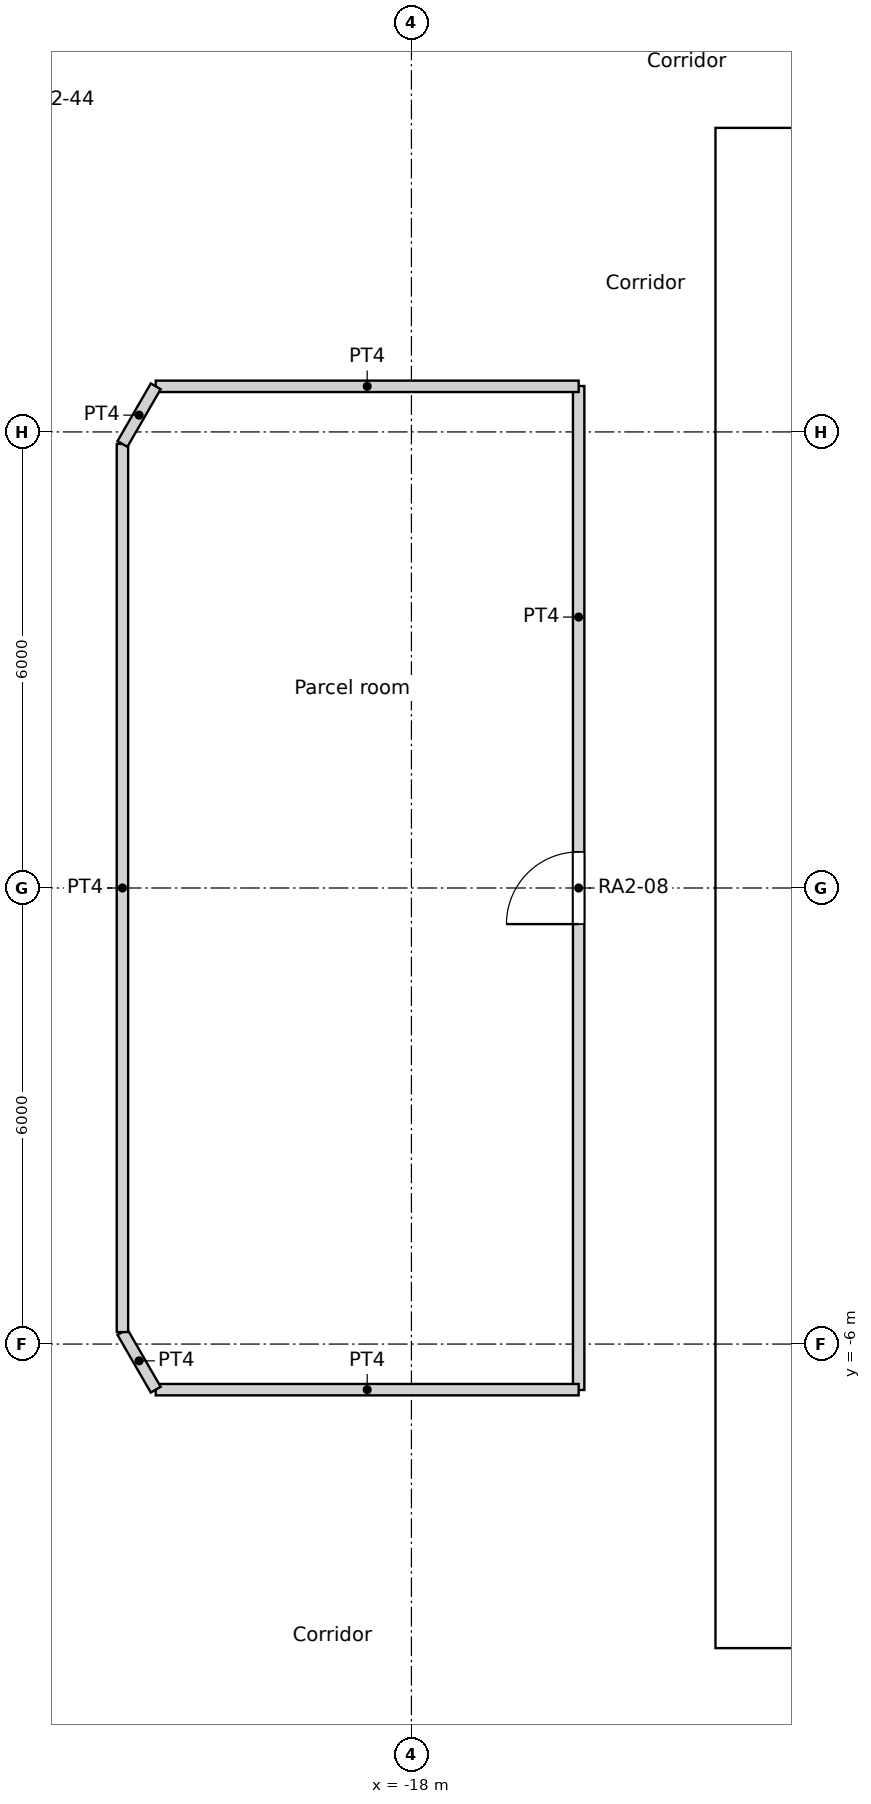
"""IFC4 building model, lengths in metres.
Left out: names, types, materials, properties, quantities, classifications, styles, units other than length and angle.
Written with IfcOpenShell. Run it as: python <this file> out.ifc"""

import sys

from ifc_helpers import new_model, si_unit, direction, frame, frame_2d, origin, origin_2d, place, context, subcontext, project, spatial, rectangle, circle, extrude, element, fill, save


model = new_model("IFC4")
c1 = context("Model", 3, precision=1e-05, world=origin(), true_north=direction((0.0, 1.0)))
c2 = subcontext(c1, "Body", "Model", "MODEL_VIEW")
j1 = project(units=[si_unit("LENGTHUNIT", "METRE"), si_unit("PLANEANGLEUNIT", "RADIAN")], contexts=[c1])
p1 = place(None, origin())
s1 = spatial("IfcSite", under=j1, at=p1, CompositionType="ELEMENT")
p2 = place(p1, origin())
s2 = spatial("IfcBuilding", under=s1, at=p2, CompositionType="ELEMENT")
p3 = place(p2, frame((0.0, 0.0, 39.0)))
s3 = spatial("IfcBuildingStorey", under=s2, at=p3, CompositionType="ELEMENT", Elevation=39.0)
for number, where, z_axis, x_axis in (
    (1, (-23.067, 8.396, 0.0), (0.0, 0.0, 1.0), (1.0, 0.0, 0.0)),
    (2, (-23.067, -8.396, 0.0), (0.0, 0.0, 1.0), (1.0, 0.0, 0.0)),
):
    element("IfcColumn", number, at=place(p3, frame(where, z_axis=z_axis, x_axis=x_axis)), inside=s3, PredefinedType="COLUMN", context=c2, shape_type="SweptSolid", body=[
        extrude(circle(Radius=0.75, at=origin_2d()), origin(), (0.0, 0.0, 1.0), 3.6),
    ])
for number, where, z_axis, x_axis in (
    (3, (-16.958, 8.167, 0.0), (0.0, 0.0, 1.0), (1.0, 0.0, 0.0)),
    (4, (-18.612, 2.805, 0.0), (0.0, 0.0, 1.0), (1.0, 0.0, 0.0)),
    (5, (-18.612, -2.805, 0.0), (0.0, 0.0, 1.0), (1.0, 0.0, 0.0)),
    (6, (-16.958, -8.167, 0.0), (0.0, 0.0, 1.0), (1.0, 0.0, 0.0)),
):
    element("IfcColumn", number, at=place(p3, frame(where, z_axis=z_axis, x_axis=x_axis)), inside=s3, PredefinedType="COLUMN", context=c2, shape_type="SweptSolid", body=[
        extrude(circle(Radius=0.8, at=origin_2d()), origin(), (0.0, 0.0, 1.0), 3.6),
    ])
p4 = place(p3, frame((-14.0, -9.4, 0.0), z_axis=(0.0, 0.0, 1.0), x_axis=(1.0, 0.0, 0.0)))
e7 = element("IfcWall", 7, at=p4, inside=s3, PredefinedType="SOLIDWALL", context=c2, shape_type="SweptSolid", body=[
    extrude(rectangle(XDim=28.0, YDim=1.2, at=frame_2d((14.0, 0.0))), origin(), (0.0, 0.0, 1.0), 3.6),
])
p5 = place(p4, frame((14.9, 0.0, 0.0)))
e8 = element("IfcOpeningElement", 8, at=p5, cuts=e7, PredefinedType="OPENING", context=c2, shape_type="SweptSolid", body=[
    extrude(rectangle(XDim=1.0, YDim=2.1, at=frame_2d((0.5, 1.05))), frame((0.0, 0.6, 0.0), z_axis=(0.0, -1.0, 0.0), x_axis=(1.0, 0.0, 0.0)), (0.0, 0.0, 1.0), 1.2),
])
p6 = place(p4, frame((9.8, 0.0, 0.0)))
e9 = element("IfcOpeningElement", 9, at=p6, cuts=e7, PredefinedType="OPENING", context=c2, shape_type="SweptSolid", body=[
    extrude(rectangle(XDim=1.8, YDim=2.1, at=frame_2d((0.9, 1.05))), frame((0.0, 0.6, 0.0), z_axis=(0.0, -1.0, 0.0), x_axis=(1.0, 0.0, 0.0)), (0.0, 0.0, 1.0), 1.2),
])
p7 = place(p4, frame((16.4, 0.0, 0.0)))
e10 = element("IfcOpeningElement", 10, at=p7, cuts=e7, PredefinedType="OPENING", context=c2, shape_type="SweptSolid", body=[
    extrude(rectangle(XDim=1.8, YDim=2.1, at=frame_2d((0.9, 1.05))), frame((0.0, 0.6, 0.0), z_axis=(0.0, -1.0, 0.0), x_axis=(1.0, 0.0, 0.0)), (0.0, 0.0, 1.0), 1.2),
])
p8 = place(p3, frame((-14.0, 9.4, 0.0), z_axis=(0.0, 0.0, 1.0), x_axis=(1.0, 0.0, 0.0)))
e11 = element("IfcWall", 11, at=p8, inside=s3, PredefinedType="SOLIDWALL", context=c2, shape_type="SweptSolid", body=[
    extrude(rectangle(XDim=28.0, YDim=1.2, at=frame_2d((14.0, 0.0))), origin(), (0.0, 0.0, 1.0), 3.6),
])
p9 = place(p8, frame((9.8, 0.0, 0.0)))
e12 = element("IfcOpeningElement", 12, at=p9, cuts=e11, PredefinedType="OPENING", context=c2, shape_type="SweptSolid", body=[
    extrude(rectangle(XDim=1.8, YDim=2.1, at=frame_2d((0.9, 1.05))), frame((0.0, 0.6, 0.0), z_axis=(0.0, -1.0, 0.0), x_axis=(1.0, 0.0, 0.0)), (0.0, 0.0, 1.0), 1.2),
])
p10 = place(p3, frame((-13.4, -8.8, 0.0), z_axis=(0.0, 0.0, 1.0), x_axis=(0.0, 1.0, 0.0)))
e13 = element("IfcWall", 13, at=p10, inside=s3, PredefinedType="SOLIDWALL", context=c2, shape_type="SweptSolid", body=[
    extrude(rectangle(XDim=17.6, YDim=1.2, at=frame_2d((8.8, 0.0))), origin(), (0.0, 0.0, 1.0), 3.6),
])
p11 = place(p10, frame((5.2, 0.0, 0.0)))
e14 = element("IfcOpeningElement", 14, at=p11, cuts=e13, PredefinedType="OPENING", context=c2, shape_type="SweptSolid", body=[
    extrude(rectangle(XDim=1.0, YDim=2.1, at=frame_2d((0.5, 1.05))), frame((0.0, 0.6, 0.0), z_axis=(0.0, -1.0, 0.0), x_axis=(1.0, 0.0, 0.0)), (0.0, 0.0, 1.0), 1.2),
])
p12 = place(p10, frame((11.4, 0.0, 0.0)))
e15 = element("IfcOpeningElement", 15, at=p12, cuts=e13, PredefinedType="OPENING", context=c2, shape_type="SweptSolid", body=[
    extrude(rectangle(XDim=1.0, YDim=2.1, at=frame_2d((0.5, 1.05))), frame((0.0, 0.6, 0.0), z_axis=(0.0, -1.0, 0.0), x_axis=(1.0, 0.0, 0.0)), (0.0, 0.0, 1.0), 1.2),
])
p13 = place(p3, frame((-15.8, -6.604, 0.0), z_axis=(0.0, 0.0, 1.0), x_axis=(0.0, 1.0, 0.0)))
e16 = element("IfcWall", 16, at=p13, inside=s3, PredefinedType="PARTITIONING", context=c2, shape_type="SweptSolid", body=[
    extrude(rectangle(XDim=13.208, YDim=0.15, at=frame_2d((6.604, 0.0))), origin(), (0.0, 0.0, 1.0), 3.15),
])
p14 = place(p13, frame((6.129, 0.0, 0.0)))
e17 = element("IfcOpeningElement", 17, at=p14, cuts=e16, PredefinedType="OPENING", context=c2, shape_type="SweptSolid", body=[
    extrude(rectangle(XDim=0.95, YDim=2.1, at=frame_2d((0.475, 1.05))), frame((0.0, 0.075, 0.0), z_axis=(0.0, -1.0, 0.0), x_axis=(1.0, 0.0, 0.0)), (0.0, 0.0, 1.0), 0.15),
])
p15 = place(p3, frame((-25.255, 7.416, 0.0), z_axis=(0.0, 0.0, 1.0), x_axis=(0.540805851332, 0.841147449123, 0.0)))
e18 = element("IfcWall", 18, at=p15, inside=s3, PredefinedType="PARTITIONING", context=c2, shape_type="SweptSolid", body=[
    extrude(rectangle(XDim=14.829, YDim=0.15, at=frame_2d((7.415, 0.0))), origin(), (0.0, 0.0, 1.0), 3.15),
])
p16 = place(p15, frame((5.453, 0.0, 0.0)))
e19 = element("IfcOpeningElement", 19, at=p16, cuts=e18, PredefinedType="OPENING", context=c2, shape_type="SweptSolid", body=[
    extrude(rectangle(XDim=1.0, YDim=2.1, at=frame_2d((0.5, 1.05))), frame((0.0, 0.075, 0.0), z_axis=(0.0, -1.0, 0.0), x_axis=(1.0, 0.0, 0.0)), (0.0, 0.0, 1.0), 0.15),
])
p17 = place(p15, frame((3.013, 0.0, 0.0)))
e20 = element("IfcOpeningElement", 20, at=p17, cuts=e18, PredefinedType="OPENING", context=c2, shape_type="SweptSolid", body=[
    extrude(rectangle(XDim=1.0, YDim=2.1, at=frame_2d((0.5, 1.05))), frame((0.0, 0.075, 0.0), z_axis=(0.0, -1.0, 0.0), x_axis=(1.0, 0.0, 0.0)), (0.0, 0.0, 1.0), 0.15),
])
p18 = place(p3, frame((-21.364, 6.6, 0.0), z_axis=(0.0, 0.0, 1.0), x_axis=(1.0, 0.0, 0.0)))
e21 = element("IfcWall", 21, at=p18, inside=s3, PredefinedType="PARTITIONING", context=c2, shape_type="SweptSolid", body=[
    extrude(rectangle(XDim=5.564, YDim=0.15, at=frame_2d((2.782, 0.0))), origin(), (0.0, 0.0, 1.0), 3.15),
])
p19 = place(p3, frame((-21.802, 5.842, 0.0), z_axis=(0.0, 0.0, 1.0), x_axis=(0.500277597875, 0.865865073245, 0.0)))
e22 = element("IfcWall", 22, at=p19, inside=s3, PredefinedType="PARTITIONING", context=c2, shape_type="SweptSolid", body=[
    extrude(rectangle(XDim=0.875, YDim=0.15, at=frame_2d((0.438, 0.0))), origin(), (0.0, 0.0, 1.0), 3.15),
])
p20 = place(p3, frame((-21.802, -5.842, 0.0), z_axis=(0.0, 0.0, 1.0), x_axis=(0.0, 1.0, 0.0)))
e23 = element("IfcWall", 23, at=p20, inside=s3, PredefinedType="PARTITIONING", context=c2, shape_type="SweptSolid", body=[
    extrude(rectangle(XDim=11.684, YDim=0.15, at=frame_2d((5.842, 0.0))), origin(), (0.0, 0.0, 1.0), 3.15),
])
p21 = place(p3, frame((-21.802, -5.842, 0.0), z_axis=(0.0, 0.0, 1.0), x_axis=(0.500277597875, -0.865865073245, 0.0)))
e24 = element("IfcWall", 24, at=p21, inside=s3, PredefinedType="PARTITIONING", context=c2, shape_type="SweptSolid", body=[
    extrude(rectangle(XDim=0.875, YDim=0.15, at=frame_2d((0.438, 0.0))), origin(), (0.0, 0.0, 1.0), 3.15),
])
p22 = place(p3, frame((-21.364, -6.6, 0.0), z_axis=(0.0, 0.0, 1.0), x_axis=(1.0, 0.0, 0.0)))
e25 = element("IfcWall", 25, at=p22, inside=s3, PredefinedType="PARTITIONING", context=c2, shape_type="SweptSolid", body=[
    extrude(rectangle(XDim=5.564, YDim=0.15, at=frame_2d((2.782, 0.0))), origin(), (0.0, 0.0, 1.0), 3.15),
])
p23 = place(p3, frame((-25.253, -7.415, 0.0), z_axis=(0.0, 0.0, 1.0), x_axis=(0.540656073354, -0.841243728265, 0.0)))
e26 = element("IfcWall", 26, at=p23, inside=s3, PredefinedType="PARTITIONING", context=c2, shape_type="SweptSolid", body=[
    extrude(rectangle(XDim=14.829, YDim=0.15, at=frame_2d((7.415, 0.0))), origin(), (0.0, 0.0, 1.0), 3.15),
])
p24 = place(p23, frame((8.903, 0.0, 0.0)))
e27 = element("IfcOpeningElement", 27, at=p24, cuts=e26, PredefinedType="OPENING", context=c2, shape_type="SweptSolid", body=[
    extrude(rectangle(XDim=1.8, YDim=2.1, at=frame_2d((0.9, 1.05))), frame((0.0, 0.075, 0.0), z_axis=(0.0, -1.0, 0.0), x_axis=(1.0, 0.0, 0.0)), (0.0, 0.0, 1.0), 0.15),
])
p25 = place(p11, origin())
e28 = element("IfcDoor", 28, at=p25, inside=s3, OperationType="DOUBLE_DOOR_SINGLE_SWING", PredefinedType="DOOR", context=c2, shape_type="SweptSolid", body=[
    extrude(rectangle(XDim=1.0, YDim=2.1, at=frame_2d((0.5, 1.05))), frame((0.0, 0.025, 0.0), z_axis=(0.0, -1.0, 0.0), x_axis=(1.0, 0.0, 0.0)), (0.0, 0.0, 1.0), 0.05),
])
fill(e14, e28)
p26 = place(p12, origin())
e29 = element("IfcDoor", 29, at=p26, inside=s3, OperationType="DOUBLE_DOOR_SINGLE_SWING", PredefinedType="DOOR", context=c2, shape_type="SweptSolid", body=[
    extrude(rectangle(XDim=1.0, YDim=2.1, at=frame_2d((0.5, 1.05))), frame((0.0, 0.025, 0.0), z_axis=(0.0, -1.0, 0.0), x_axis=(1.0, 0.0, 0.0)), (0.0, 0.0, 1.0), 0.05),
])
fill(e15, e29)
p27 = place(p14, origin())
e30 = element("IfcDoor", 30, at=p27, inside=s3, OperationType="SINGLE_SWING_LEFT", PredefinedType="DOOR", context=c2, shape_type="SweptSolid", body=[
    extrude(rectangle(XDim=0.95, YDim=2.1, at=frame_2d((0.475, 1.05))), frame((0.0, 0.025, 0.0), z_axis=(0.0, -1.0, 0.0), x_axis=(1.0, 0.0, 0.0)), (0.0, 0.0, 1.0), 0.05),
])
fill(e17, e30)
save(model, sys.argv[1])
